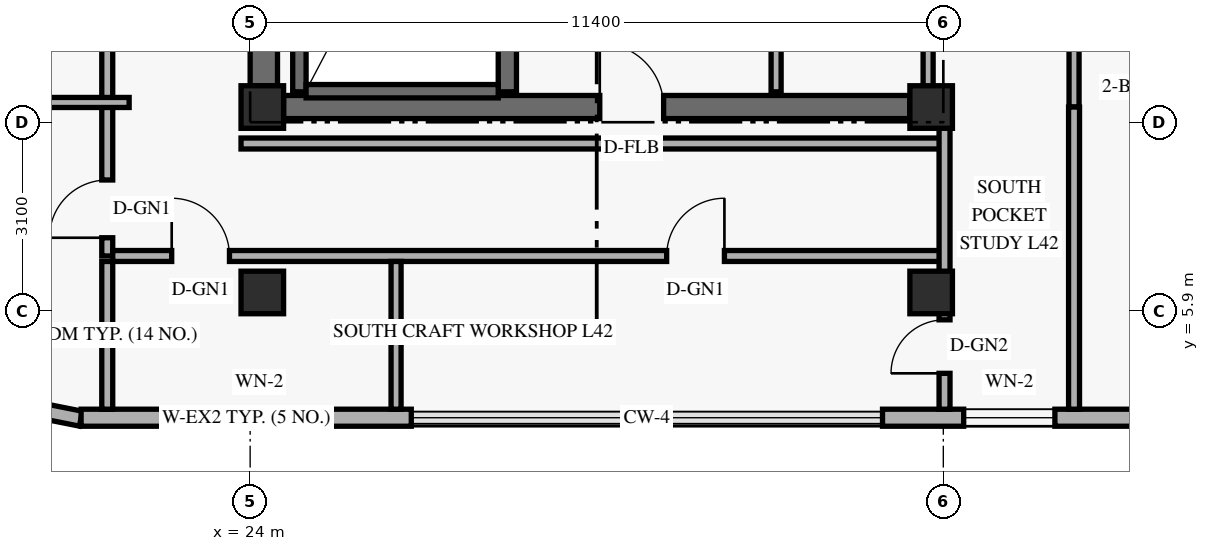
"""IFC4 building model, lengths in metres.
Left out: names, types, materials, properties, quantities, classifications, styles, units other than length and angle.
Written with IfcOpenShell. Run it as: python <this file> out.ifc"""

import sys

from ifc_helpers import new_model, si_unit, direction, frame, frame_2d, origin, origin_2d, place, context, subcontext, project, spatial, rectangle, extrude, element, fill, save


model = new_model("IFC4")
c1 = context("Model", 3, precision=1e-05, world=origin(), true_north=direction((0.0, 1.0)))
c2 = subcontext(c1, "Body", "Model", "MODEL_VIEW")
j1 = project(units=[si_unit("LENGTHUNIT", "METRE"), si_unit("PLANEANGLEUNIT", "RADIAN")], contexts=[c1])
p1 = place(None, origin())
s1 = spatial("IfcSite", under=j1, at=p1, CompositionType="ELEMENT")
p2 = place(p1, origin())
s2 = spatial("IfcBuilding", under=s1, at=p2, CompositionType="ELEMENT")
p3 = place(p2, frame((0.0, 0.0, 162.6)))
s3 = spatial("IfcBuildingStorey", under=s2, at=p3, CompositionType="ELEMENT", Elevation=162.6)
p4 = place(p3, frame((24.225, 9.6, 0.0), z_axis=(0.0, 0.0, 1.0), x_axis=(0.0, 1.0, 0.0)))
e1 = element("IfcWall", 1, at=p4, inside=s3, PredefinedType="SHEAR", context=c2, shape_type="SweptSolid", body=[
    extrude(rectangle(XDim=7.6, YDim=0.45, at=frame_2d((3.8, 0.0))), origin(), (0.0, 0.0, 1.0), 2.748),
])
p5 = place(p3, frame((24.55, 9.25, 0.0), z_axis=(0.0, 0.0, 1.0), x_axis=(1.0, 0.0, 0.0)))
e2 = element("IfcWall", 2, at=p5, inside=s3, PredefinedType="SHEAR", context=c2, shape_type="SweptSolid", body=[
    extrude(rectangle(XDim=10.3, YDim=0.38, at=frame_2d((5.15, 0.0))), origin(), (0.0, 0.0, 1.0), 3.36),
])
p6 = place(p5, frame((5.2, 0.0, 0.0)))
e3 = element("IfcOpeningElement", 3, at=p6, cuts=e2, PredefinedType="OPENING", context=c2, shape_type="SweptSolid", body=[
    extrude(rectangle(XDim=1.05, YDim=2.15, at=frame_2d((0.525, 1.075))), frame((0.0, 0.2, 0.0), z_axis=(0.0, -1.0, 0.0), x_axis=(1.0, 0.0, 0.0)), (0.0, 0.0, 1.0), 0.4),
])
p7 = place(p3, frame((24.81, 9.5, 0.0), z_axis=(0.0, 0.0, 1.0), x_axis=(0.0, 1.0, 0.0)))
e4 = element("IfcWall", 4, at=p7, inside=s3, PredefinedType="SHEAR", context=c2, shape_type="SweptSolid", body=[
    extrude(rectangle(XDim=7.76, YDim=0.22, at=frame_2d((3.88, 0.0))), origin(), (0.0, 0.0, 1.0), 3.36),
])
p8 = place(p3, frame((28.23, 9.5, 0.0), z_axis=(0.0, 0.0, 1.0), x_axis=(0.0, 1.0, 0.0)))
e5 = element("IfcWall", 5, at=p8, inside=s3, PredefinedType="SHEAR", context=c2, shape_type="SweptSolid", body=[
    extrude(rectangle(XDim=7.76, YDim=0.3, at=frame_2d((3.88, 0.0))), origin(), (0.0, 0.0, 1.0), 3.36),
])
p9 = place(p3, frame((24.92, 9.51, 0.0), z_axis=(0.0, 0.0, 1.0), x_axis=(1.0, 0.0, 0.0)))
e6 = element("IfcWall", 6, at=p9, inside=s3, PredefinedType="SHEAR", context=c2, shape_type="SweptSolid", body=[
    extrude(rectangle(XDim=3.16, YDim=0.22, at=frame_2d((1.58, 0.0))), origin(), (0.0, 0.0, 1.0), 3.36),
])
for number, where, z_axis, x_axis in (
    (7, (24.2, 6.2, 0.0), (0.0, 0.0, 1.0), (1.0, 0.0, 0.0)),
    (8, (24.2, 9.25, 0.0), (0.0, 0.0, 1.0), (1.0, 0.0, 0.0)),
    (9, (35.2, 6.2, 0.0), (0.0, 0.0, 1.0), (1.0, 0.0, 0.0)),
    (10, (35.2, 9.25, 0.0), (0.0, 0.0, 1.0), (1.0, 0.0, 0.0)),
):
    element("IfcColumn", number, at=place(p3, frame(where, z_axis=z_axis, x_axis=x_axis)), inside=s3, PredefinedType="COLUMN", context=c2, shape_type="SweptSolid", body=[
        extrude(rectangle(XDim=0.7, YDim=0.7, at=origin_2d()), origin(), (0.0, 0.0, 1.0), 3.6),
    ])
p10 = place(p3, frame((19.854, 4.395, 0.0), z_axis=(0.0, 0.0, 1.0), x_axis=(0.980809899341, -0.19496651342, 0.0)))
e11 = element("IfcWall", 11, at=p10, inside=s3, PredefinedType="SOLIDWALL", context=c2, shape_type="SweptSolid", body=[
    extrude(rectangle(XDim=1.389, YDim=0.25, at=frame_2d((0.694, 0.0))), origin(), (0.0, 0.0, 1.0), 3.36),
])
p11 = place(p3, frame((21.22, 4.14, 0.0), z_axis=(0.0, 0.0, 1.0), x_axis=(1.0, 0.0, 0.0)))
e12 = element("IfcWall", 12, at=p11, inside=s3, PredefinedType="SOLIDWALL", context=c2, shape_type="SweptSolid", body=[
    extrude(rectangle(XDim=5.43, YDim=0.28, at=frame_2d((2.715, 0.0))), origin(), (0.0, 0.0, 1.0), 3.36),
])
p12 = place(p11, frame((2.18, 0.0, 0.85)))
e13 = element("IfcOpeningElement", 13, at=p12, cuts=e12, PredefinedType="OPENING", context=c2, shape_type="SweptSolid", body=[
    extrude(rectangle(XDim=1.5, YDim=1.55, at=frame_2d((0.75, 0.775))), frame((0.0, 0.15, 0.0), z_axis=(0.0, -1.0, 0.0), x_axis=(1.0, 0.0, 0.0)), (0.0, 0.0, 1.0), 0.3),
])
p13 = place(p3, frame((34.4, 4.14, 0.0), z_axis=(0.0, 0.0, 1.0), x_axis=(1.0, 0.0, 0.0)))
e14 = element("IfcWall", 14, at=p13, inside=s3, PredefinedType="SOLIDWALL", context=c2, shape_type="SweptSolid", body=[
    extrude(rectangle(XDim=20.58, YDim=0.28, at=frame_2d((10.29, 0.0))), origin(), (0.0, 0.0, 1.0), 3.36),
])
p14 = place(p13, frame((1.335, 0.0, 0.85)))
e15 = element("IfcOpeningElement", 15, at=p14, cuts=e14, PredefinedType="OPENING", context=c2, shape_type="SweptSolid", body=[
    extrude(rectangle(XDim=1.5, YDim=1.55, at=frame_2d((0.75, 0.775))), frame((0.0, 0.15, 0.0), z_axis=(0.0, -1.0, 0.0), x_axis=(1.0, 0.0, 0.0)), (0.0, 0.0, 1.0), 0.3),
])
p15 = place(p13, frame((5.53, 0.0, 0.85)))
e16 = element("IfcOpeningElement", 16, at=p15, cuts=e14, PredefinedType="OPENING", context=c2, shape_type="SweptSolid", body=[
    extrude(rectangle(XDim=1.5, YDim=1.55, at=frame_2d((0.75, 0.775))), frame((0.0, 0.15, 0.0), z_axis=(0.0, -1.0, 0.0), x_axis=(1.0, 0.0, 0.0)), (0.0, 0.0, 1.0), 0.3),
])
p16 = place(p13, frame((11.655, 0.0, 0.85)))
e17 = element("IfcOpeningElement", 17, at=p16, cuts=e14, PredefinedType="OPENING", context=c2, shape_type="SweptSolid", body=[
    extrude(rectangle(XDim=1.5, YDim=1.55, at=frame_2d((0.75, 0.775))), frame((0.0, 0.15, 0.0), z_axis=(0.0, -1.0, 0.0), x_axis=(1.0, 0.0, 0.0)), (0.0, 0.0, 1.0), 0.3),
])
p17 = place(p13, frame((17.24, 0.0, 0.85)))
e18 = element("IfcOpeningElement", 18, at=p17, cuts=e14, PredefinedType="OPENING", context=c2, shape_type="SweptSolid", body=[
    extrude(rectangle(XDim=1.5, YDim=1.55, at=frame_2d((0.75, 0.775))), frame((0.0, 0.15, 0.0), z_axis=(0.0, -1.0, 0.0), x_axis=(1.0, 0.0, 0.0)), (0.0, 0.0, 1.0), 0.3),
])
p18 = place(p3, frame((32.65, 9.5, 0.0), z_axis=(0.0, 0.0, 1.0), x_axis=(0.0, 1.0, 0.0)))
e19 = element("IfcWall", 19, at=p18, inside=s3, PredefinedType="PARTITIONING", context=c2, shape_type="SweptSolid", body=[
    extrude(rectangle(XDim=6.08, YDim=0.165, at=frame_2d((3.04, 0.0))), origin(), (0.0, 0.0, 1.0), 3.36),
])
p19 = place(p3, frame((37.55, 9.25, 0.0), z_axis=(0.0, 0.0, 1.0), x_axis=(0.0, 1.0, 0.0)))
e20 = element("IfcWall", 20, at=p19, inside=s3, PredefinedType="PARTITIONING", context=c2, shape_type="SweptSolid", body=[
    extrude(rectangle(XDim=6.248, YDim=0.165, at=frame_2d((3.124, 0.0))), origin(), (0.0, 0.0, 1.0), 2.73),
])
p20 = place(p3, frame((35.15, 9.5, 0.0), z_axis=(0.0, 0.0, 1.0), x_axis=(0.0, 1.0, 0.0)))
e21 = element("IfcWall", 21, at=p20, inside=s3, PredefinedType="PARTITIONING", context=c2, shape_type="SweptSolid", body=[
    extrude(rectangle(XDim=5.998, YDim=0.165, at=frame_2d((2.999, 0.0))), origin(), (0.0, 0.0, 1.0), 2.73),
])
p21 = place(p3, frame((21.65, 6.8, 0.0), z_axis=(0.0, 0.0, 1.0), x_axis=(0.0, 1.0, 0.0)))
e22 = element("IfcWall", 22, at=p21, inside=s3, PredefinedType="STANDARD", context=c2, shape_type="SweptSolid", body=[
    extrude(rectangle(XDim=34.4, YDim=0.18, at=frame_2d((17.2, 0.0))), origin(), (0.0, 0.0, 1.0), 2.73),
])
p22 = place(p21, frame((0.3, 0.0, 0.0)))
e23 = element("IfcOpeningElement", 23, at=p22, cuts=e22, PredefinedType="OPENING", context=c2, shape_type="SweptSolid", body=[
    extrude(rectangle(XDim=0.95, YDim=2.15, at=frame_2d((0.475, 1.075))), frame((0.0, 0.1, 0.0), z_axis=(0.0, -1.0, 0.0), x_axis=(1.0, 0.0, 0.0)), (0.0, 0.0, 1.0), 0.2),
])
p23 = place(p21, frame((4.167, 0.0, 0.0)))
e24 = element("IfcOpeningElement", 24, at=p23, cuts=e22, PredefinedType="OPENING", context=c2, shape_type="SweptSolid", body=[
    extrude(rectangle(XDim=0.95, YDim=2.15, at=frame_2d((0.475, 1.075))), frame((0.0, 0.1, 0.0), z_axis=(0.0, -1.0, 0.0), x_axis=(1.0, 0.0, 0.0)), (0.0, 0.0, 1.0), 0.2),
])
p24 = place(p21, frame((8.77, 0.0, 0.0)))
e25 = element("IfcOpeningElement", 25, at=p24, cuts=e22, PredefinedType="OPENING", context=c2, shape_type="SweptSolid", body=[
    extrude(rectangle(XDim=0.95, YDim=2.15, at=frame_2d((0.475, 1.075))), frame((0.0, 0.1, 0.0), z_axis=(0.0, -1.0, 0.0), x_axis=(1.0, 0.0, 0.0)), (0.0, 0.0, 1.0), 0.2),
])
p25 = place(p21, frame((13.88, 0.0, 0.0)))
e26 = element("IfcOpeningElement", 26, at=p25, cuts=e22, PredefinedType="OPENING", context=c2, shape_type="SweptSolid", body=[
    extrude(rectangle(XDim=0.95, YDim=2.15, at=frame_2d((0.475, 1.075))), frame((0.0, 0.1, 0.0), z_axis=(0.0, -1.0, 0.0), x_axis=(1.0, 0.0, 0.0)), (0.0, 0.0, 1.0), 0.2),
])
p26 = place(p21, frame((19.395, 0.0, 0.0)))
e27 = element("IfcOpeningElement", 27, at=p26, cuts=e22, PredefinedType="OPENING", context=c2, shape_type="SweptSolid", body=[
    extrude(rectangle(XDim=0.95, YDim=2.15, at=frame_2d((0.475, 1.075))), frame((0.0, 0.1, 0.0), z_axis=(0.0, -1.0, 0.0), x_axis=(1.0, 0.0, 0.0)), (0.0, 0.0, 1.0), 0.2),
])
p27 = place(p21, frame((24.505, 0.0, 0.0)))
e28 = element("IfcOpeningElement", 28, at=p27, cuts=e22, PredefinedType="OPENING", context=c2, shape_type="SweptSolid", body=[
    extrude(rectangle(XDim=0.95, YDim=2.15, at=frame_2d((0.475, 1.075))), frame((0.0, 0.1, 0.0), z_axis=(0.0, -1.0, 0.0), x_axis=(1.0, 0.0, 0.0)), (0.0, 0.0, 1.0), 0.2),
])
p28 = place(p21, frame((29.782, 0.0, 0.0)))
e29 = element("IfcOpeningElement", 29, at=p28, cuts=e22, PredefinedType="OPENING", context=c2, shape_type="SweptSolid", body=[
    extrude(rectangle(XDim=0.95, YDim=2.15, at=frame_2d((0.475, 1.075))), frame((0.0, 0.1, 0.0), z_axis=(0.0, -1.0, 0.0), x_axis=(1.0, 0.0, 0.0)), (0.0, 0.0, 1.0), 0.2),
])
p29 = place(p21, frame((33.19, 0.0, 0.0)))
e30 = element("IfcOpeningElement", 30, at=p29, cuts=e22, PredefinedType="OPENING", context=c2, shape_type="SweptSolid", body=[
    extrude(rectangle(XDim=0.95, YDim=2.15, at=frame_2d((0.475, 1.075))), frame((0.0, 0.1, 0.0), z_axis=(0.0, -1.0, 0.0), x_axis=(1.0, 0.0, 0.0)), (0.0, 0.0, 1.0), 0.2),
])
p30 = place(p3, frame((21.74, 6.8, 0.0), z_axis=(0.0, 0.0, 1.0), x_axis=(1.0, 0.0, 0.0)))
e31 = element("IfcWall", 31, at=p30, inside=s3, PredefinedType="STANDARD", context=c2, shape_type="SweptSolid", body=[
    extrude(rectangle(XDim=13.68, YDim=0.18, at=frame_2d((6.84, 0.0))), origin(), (0.0, 0.0, 1.0), 2.73),
])
p31 = place(p30, frame((0.97, 0.0, 0.0)))
e32 = element("IfcOpeningElement", 32, at=p31, cuts=e31, PredefinedType="OPENING", context=c2, shape_type="SweptSolid", body=[
    extrude(rectangle(XDim=0.95, YDim=2.15, at=frame_2d((0.475, 1.075))), frame((0.0, 0.1, 0.0), z_axis=(0.0, -1.0, 0.0), x_axis=(1.0, 0.0, 0.0)), (0.0, 0.0, 1.0), 0.2),
])
p32 = place(p30, frame((9.11, 0.0, 0.0)))
e33 = element("IfcOpeningElement", 33, at=p32, cuts=e31, PredefinedType="OPENING", context=c2, shape_type="SweptSolid", body=[
    extrude(rectangle(XDim=0.95, YDim=2.15, at=frame_2d((0.475, 1.075))), frame((0.0, 0.1, 0.0), z_axis=(0.0, -1.0, 0.0), x_axis=(1.0, 0.0, 0.0)), (0.0, 0.0, 1.0), 0.2),
])
p33 = place(p3, frame((23.85, 8.65, 0.0), z_axis=(0.0, 0.0, 1.0), x_axis=(1.0, 0.0, 0.0)))
e34 = element("IfcWall", 34, at=p33, inside=s3, PredefinedType="STANDARD", context=c2, shape_type="SweptSolid", body=[
    extrude(rectangle(XDim=11.57, YDim=0.18, at=frame_2d((5.785, 0.0))), origin(), (0.0, 0.0, 1.0), 2.73),
])
p34 = place(p3, frame((21.65, 4.28, 0.0), z_axis=(0.0, 0.0, 1.0), x_axis=(0.0, 1.0, 0.0)))
e35 = element("IfcWall", 35, at=p34, inside=s3, PredefinedType="PARTITIONING", context=c2, shape_type="SweptSolid", body=[
    extrude(rectangle(XDim=2.43, YDim=0.18, at=frame_2d((1.215, 0.0))), origin(), (0.0, 0.0, 1.0), 2.879),
])
p35 = place(p3, frame((35.42, 4.28, 0.0), z_axis=(0.0, 0.0, 1.0), x_axis=(0.0, 1.0, 0.0)))
e36 = element("IfcWall", 36, at=p35, inside=s3, PredefinedType="PARTITIONING", context=c2, shape_type="SweptSolid", body=[
    extrude(rectangle(XDim=4.97, YDim=0.18, at=frame_2d((2.485, 0.0))), origin(), (0.0, 0.0, 1.0), 2.73),
])
p36 = place(p35, frame((0.59, 0.0, 0.0)))
e37 = element("IfcOpeningElement", 37, at=p36, cuts=e36, PredefinedType="OPENING", context=c2, shape_type="SweptSolid", body=[
    extrude(rectangle(XDim=0.88, YDim=2.12, at=frame_2d((0.44, 1.06))), frame((0.0, 0.1, 0.0), z_axis=(0.0, -1.0, 0.0), x_axis=(1.0, 0.0, 0.0)), (0.0, 0.0, 1.0), 0.2),
])
p37 = place(p3, frame((37.55, 4.28, 0.0), z_axis=(0.0, 0.0, 1.0), x_axis=(0.0, 1.0, 0.0)))
e38 = element("IfcWall", 38, at=p37, inside=s3, PredefinedType="PARTITIONING", context=c2, shape_type="SweptSolid", body=[
    extrude(rectangle(XDim=4.97, YDim=0.18, at=frame_2d((2.485, 0.0))), origin(), (0.0, 0.0, 1.0), 2.73),
])
p38 = place(p3, frame((17.88, 9.325, 0.0), z_axis=(0.0, 0.0, 1.0), x_axis=(1.0, 0.0, 0.0)))
e39 = element("IfcWall", 39, at=p38, inside=s3, PredefinedType="PARTITIONING", context=c2, shape_type="SweptSolid", body=[
    extrude(rectangle(XDim=4.13, YDim=0.165, at=frame_2d((2.065, 0.0))), origin(), (0.0, 0.0, 1.0), 2.73),
])
p39 = place(p3, frame((26.4, 4.28, 0.0), z_axis=(0.0, 0.0, 1.0), x_axis=(0.0, 1.0, 0.0)))
e40 = element("IfcWall", 40, at=p39, inside=s3, PredefinedType="PARTITIONING", context=c2, shape_type="SweptSolid", body=[
    extrude(rectangle(XDim=2.43, YDim=0.165, at=frame_2d((1.215, 0.0))), origin(), (0.0, 0.0, 1.0), 2.879),
])
p40 = place(p12, origin())
e41 = element("IfcWindow", 41, at=p40, inside=s3, PartitioningType="SINGLE_PANEL", PredefinedType="WINDOW", context=c2, shape_type="SweptSolid", body=[
    extrude(rectangle(XDim=1.5, YDim=1.55, at=frame_2d((0.75, 0.775))), frame((0.0, 0.03, 0.0), z_axis=(0.0, -1.0, 0.0), x_axis=(1.0, 0.0, 0.0)), (0.0, 0.0, 1.0), 0.06),
])
fill(e13, e41)
p41 = place(p14, origin())
e42 = element("IfcWindow", 42, at=p41, inside=s3, PartitioningType="SINGLE_PANEL", PredefinedType="WINDOW", context=c2, shape_type="SweptSolid", body=[
    extrude(rectangle(XDim=1.5, YDim=1.55, at=frame_2d((0.75, 0.775))), frame((0.0, 0.03, 0.0), z_axis=(0.0, -1.0, 0.0), x_axis=(1.0, 0.0, 0.0)), (0.0, 0.0, 1.0), 0.06),
])
fill(e15, e42)
p42 = place(p6, origin())
e43 = element("IfcDoor", 43, at=p42, inside=s3, OperationType="SINGLE_SWING_LEFT", PredefinedType="DOOR", context=c2, shape_type="SweptSolid", body=[
    extrude(rectangle(XDim=1.05, YDim=2.15, at=frame_2d((0.525, 1.075))), frame((0.0, 0.025, 0.0), z_axis=(0.0, -1.0, 0.0), x_axis=(1.0, 0.0, 0.0)), (0.0, 0.0, 1.0), 0.05),
])
fill(e3, e43)
p43 = place(p36, origin())
e44 = element("IfcDoor", 44, at=p43, inside=s3, OperationType="SINGLE_SWING_LEFT", PredefinedType="DOOR", context=c2, shape_type="SweptSolid", body=[
    extrude(rectangle(XDim=0.88, YDim=2.12, at=frame_2d((0.44, 1.06))), frame((0.0, 0.025, 0.0), z_axis=(0.0, -1.0, 0.0), x_axis=(1.0, 0.0, 0.0)), (0.0, 0.0, 1.0), 0.05),
])
fill(e37, e44)
p44 = place(p22, origin())
e45 = element("IfcDoor", 45, at=p44, inside=s3, OperationType="SINGLE_SWING_LEFT", PredefinedType="DOOR", context=c2, shape_type="SweptSolid", body=[
    extrude(rectangle(XDim=0.95, YDim=2.15, at=frame_2d((0.475, 1.075))), frame((0.0, 0.025, 0.0), z_axis=(0.0, -1.0, 0.0), x_axis=(1.0, 0.0, 0.0)), (0.0, 0.0, 1.0), 0.05),
])
fill(e23, e45)
p45 = place(p31, origin())
e46 = element("IfcDoor", 46, at=p45, inside=s3, OperationType="SINGLE_SWING_LEFT", PredefinedType="DOOR", context=c2, shape_type="SweptSolid", body=[
    extrude(rectangle(XDim=0.95, YDim=2.15, at=frame_2d((0.475, 1.075))), frame((0.0, 0.025, 0.0), z_axis=(0.0, -1.0, 0.0), x_axis=(1.0, 0.0, 0.0)), (0.0, 0.0, 1.0), 0.05),
])
fill(e32, e46)
p46 = place(p32, origin())
e47 = element("IfcDoor", 47, at=p46, inside=s3, OperationType="SINGLE_SWING_RIGHT", PredefinedType="DOOR", context=c2, shape_type="SweptSolid", body=[
    extrude(rectangle(XDim=0.95, YDim=2.15, at=frame_2d((0.475, 1.075))), frame((0.0, 0.025, 0.0), z_axis=(0.0, -1.0, 0.0), x_axis=(1.0, 0.0, 0.0)), (0.0, 0.0, 1.0), 0.05),
])
fill(e33, e47)
save(model, sys.argv[1])
